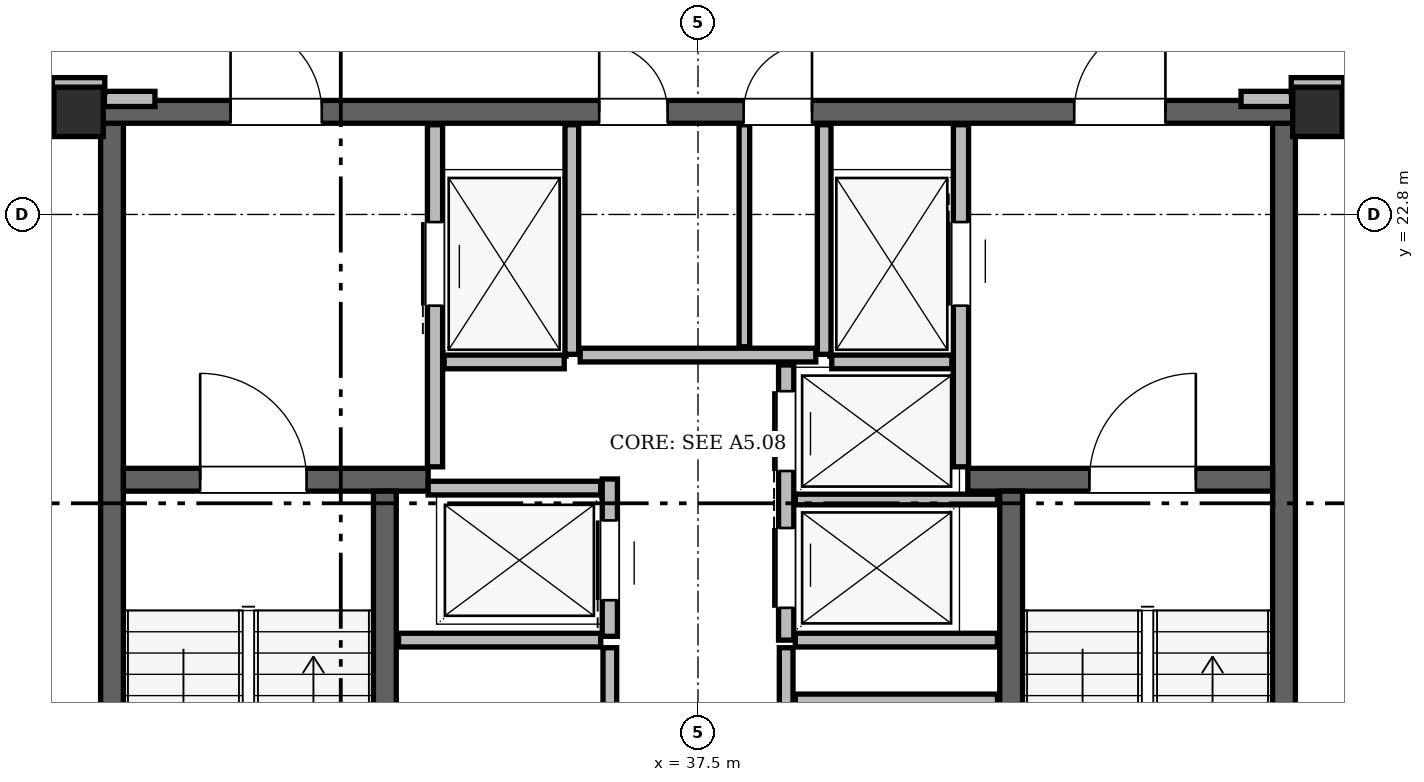
"""IFC4 building model, lengths in metres.
Left out: names, types, materials, properties, quantities, classifications, styles, units other than length and angle.
Written with IfcOpenShell. Run it as: python <this file> out.ifc"""

import sys

from ifc_helpers import new_model, si_unit, direction, frame, frame_2d, origin, origin_2d, place, context, subcontext, project, spatial, rectangle, hollow_rectangle, extrude, element, fill, save


model = new_model("IFC4")
c1 = context("Model", 3, precision=1e-05, world=origin(), true_north=direction((0.0, 1.0)))
c2 = subcontext(c1, "Body", "Model", "MODEL_VIEW")
j1 = project(units=[si_unit("LENGTHUNIT", "METRE"), si_unit("PLANEANGLEUNIT", "RADIAN")], contexts=[c1])
p1 = place(None, origin())
s1 = spatial("IfcSite", under=j1, at=p1, CompositionType="ELEMENT")
p2 = place(p1, origin())
s2 = spatial("IfcBuilding", under=s1, at=p2, CompositionType="ELEMENT")
p3 = place(p2, frame((0.0, 0.0, 305.1)))
s3 = spatial("IfcBuildingStorey", under=s2, at=p3, CompositionType="ELEMENT", Elevation=305.1)
for number, where, z_axis, x_axis in (
    (1, (45.65, 24.15, 0.0), (0.0, 0.0, 1.0), (1.0, 0.0, 0.0)),
    (2, (29.35, 24.15, 0.0), (0.0, 0.0, 1.0), (1.0, 0.0, 0.0)),
):
    element("IfcColumn", number, at=place(p3, frame(where, z_axis=z_axis, x_axis=x_axis)), inside=s3, PredefinedType="COLUMN", context=c2, shape_type="SweptSolid", body=[
        extrude(hollow_rectangle(XDim=0.65, YDim=0.65, WallThickness=0.05, at=origin_2d()), origin(), (0.0, 0.0, 1.0), 4.5),
    ])
for number, where, z_axis, x_axis in (
    (3, (29.79, 11.0, 0.0), (0.0, 0.0, 1.0), (0.0, 1.0, 0.0)),
    (4, (45.21, 11.0, 0.0), (0.0, 0.0, 1.0), (0.0, 1.0, 0.0)),
):
    element("IfcWall", number, at=place(p3, frame(where, z_axis=z_axis, x_axis=x_axis)), inside=s3, PredefinedType="SHEAR", context=c2, shape_type="SweptSolid", body=[
        extrude(rectangle(XDim=13.3, YDim=0.3, at=frame_2d((6.65, 0.0))), origin(), (0.0, 0.0, 1.0), 4.28),
    ])
p4 = place(p3, frame((29.65, 24.15, 0.0), z_axis=(0.0, 0.0, 1.0), x_axis=(1.0, 0.0, 0.0)))
e5 = element("IfcWall", 5, at=p4, inside=s3, PredefinedType="SHEAR", context=c2, shape_type="SweptSolid", body=[
    extrude(rectangle(XDim=15.7, YDim=0.3, at=frame_2d((7.85, 0.0))), origin(), (0.0, 0.0, 1.0), 4.28),
])
p5 = place(p4, frame((1.7, 0.0, 0.0)))
e6 = element("IfcOpeningElement", 6, at=p5, cuts=e5, PredefinedType="OPENING", context=c2, shape_type="SweptSolid", body=[
    extrude(rectangle(XDim=1.2, YDim=2.2, at=frame_2d((0.6, 1.1))), frame((0.0, 0.15, 0.0), z_axis=(0.0, -1.0, 0.0), x_axis=(1.0, 0.0, 0.0)), (0.0, 0.0, 1.0), 0.3),
])
p6 = place(p4, frame((12.8, 0.0, 0.0)))
e7 = element("IfcOpeningElement", 7, at=p6, cuts=e5, PredefinedType="OPENING", context=c2, shape_type="SweptSolid", body=[
    extrude(rectangle(XDim=1.2, YDim=2.2, at=frame_2d((0.6, 1.1))), frame((0.0, 0.15, 0.0), z_axis=(0.0, -1.0, 0.0), x_axis=(1.0, 0.0, 0.0)), (0.0, 0.0, 1.0), 0.3),
])
p7 = place(p4, frame((6.55, 0.0, 0.0)))
e8 = element("IfcOpeningElement", 8, at=p7, cuts=e5, PredefinedType="OPENING", context=c2, shape_type="SweptSolid", body=[
    extrude(rectangle(XDim=0.9, YDim=2.05, at=frame_2d((0.45, 1.025))), frame((0.0, 0.15, 0.0), z_axis=(0.0, -1.0, 0.0), x_axis=(1.0, 0.0, 0.0)), (0.0, 0.0, 1.0), 0.3),
])
p8 = place(p4, frame((8.45, 0.0, 0.0)))
e9 = element("IfcOpeningElement", 9, at=p8, cuts=e5, PredefinedType="OPENING", context=c2, shape_type="SweptSolid", body=[
    extrude(rectangle(XDim=0.9, YDim=2.05, at=frame_2d((0.45, 1.025))), frame((0.0, 0.15, 0.0), z_axis=(0.0, -1.0, 0.0), x_axis=(1.0, 0.0, 0.0)), (0.0, 0.0, 1.0), 0.3),
])
p9 = place(p3, frame((29.94, 19.31, 0.0), z_axis=(0.0, 0.0, 1.0), x_axis=(1.0, 0.0, 0.0)))
e10 = element("IfcWall", 10, at=p9, inside=s3, PredefinedType="SHEAR", context=c2, shape_type="SweptSolid", body=[
    extrude(rectangle(XDim=4.01, YDim=0.3, at=frame_2d((2.005, 0.0))), origin(), (0.0, 0.0, 1.0), 4.28),
])
p10 = place(p9, frame((1.01, 0.0, 0.0)))
e11 = element("IfcOpeningElement", 11, at=p10, cuts=e10, PredefinedType="OPENING", context=c2, shape_type="SweptSolid", body=[
    extrude(rectangle(XDim=1.4, YDim=2.2, at=frame_2d((0.7, 1.1))), frame((0.0, 0.15, 0.0), z_axis=(0.0, -1.0, 0.0), x_axis=(1.0, 0.0, 0.0)), (0.0, 0.0, 1.0), 0.3),
])
p11 = place(p3, frame((41.05, 19.31, 0.0), z_axis=(0.0, 0.0, 1.0), x_axis=(1.0, 0.0, 0.0)))
e12 = element("IfcWall", 12, at=p11, inside=s3, PredefinedType="SHEAR", context=c2, shape_type="SweptSolid", body=[
    extrude(rectangle(XDim=4.01, YDim=0.3, at=frame_2d((2.005, 0.0))), origin(), (0.0, 0.0, 1.0), 4.28),
])
p12 = place(p11, frame((1.6, 0.0, 0.0)))
e13 = element("IfcOpeningElement", 13, at=p12, cuts=e12, PredefinedType="OPENING", context=c2, shape_type="SweptSolid", body=[
    extrude(rectangle(XDim=1.4, YDim=2.2, at=frame_2d((0.7, 1.1))), frame((0.0, 0.15, 0.0), z_axis=(0.0, -1.0, 0.0), x_axis=(1.0, 0.0, 0.0)), (0.0, 0.0, 1.0), 0.3),
])
for number, where, z_axis, x_axis in (
    (14, (33.38, 11.54, 0.0), (0.0, 0.0, 1.0), (0.0, 1.0, 0.0)),
    (15, (41.62, 11.54, 0.0), (0.0, 0.0, 1.0), (0.0, 1.0, 0.0)),
):
    element("IfcWall", number, at=place(p3, frame(where, z_axis=z_axis, x_axis=x_axis)), inside=s3, PredefinedType="SHEAR", context=c2, shape_type="SweptSolid", body=[
        extrude(rectangle(XDim=7.62, YDim=0.3, at=frame_2d((3.81, 0.0))), origin(), (0.0, 0.0, 1.0), 4.28),
    ])
p13 = place(p3, frame((34.04, 19.48, 0.0), z_axis=(0.0, 0.0, 1.0), x_axis=(0.0, 1.0, 0.0)))
e16 = element("IfcWall", 16, at=p13, inside=s3, PredefinedType="PARTITIONING", context=c2, shape_type="SweptSolid", body=[
    extrude(rectangle(XDim=4.5, YDim=0.2, at=frame_2d((2.25, 0.0))), origin(), (0.0, 0.0, 1.0), 4.28),
])
p14 = place(p13, frame((2.12, 0.0, 0.0)))
e17 = element("IfcOpeningElement", 17, at=p14, cuts=e16, PredefinedType="OPENING", context=c2, shape_type="SweptSolid", body=[
    extrude(rectangle(XDim=1.1, YDim=2.2, at=frame_2d((0.55, 1.1))), frame((0.0, 0.1, 0.0), z_axis=(0.0, -1.0, 0.0), x_axis=(1.0, 0.0, 0.0)), (0.0, 0.0, 1.0), 0.2),
])
p15 = place(p3, frame((35.84, 20.96, 0.0), z_axis=(0.0, 0.0, 1.0), x_axis=(0.0, 1.0, 0.0)))
e18 = element("IfcWall", 18, at=p15, inside=s3, PredefinedType="PARTITIONING", context=c2, shape_type="SweptSolid", body=[
    extrude(rectangle(XDim=3.02, YDim=0.18, at=frame_2d((1.51, 0.0))), origin(), (0.0, 0.0, 1.0), 4.28),
])
p16 = place(p3, frame((34.16, 20.86, 0.0), z_axis=(0.0, 0.0, 1.0), x_axis=(1.0, 0.0, 0.0)))
e19 = element("IfcWall", 19, at=p16, inside=s3, PredefinedType="PARTITIONING", context=c2, shape_type="SweptSolid", body=[
    extrude(rectangle(XDim=1.58, YDim=0.18, at=frame_2d((0.79, 0.0))), origin(), (0.0, 0.0, 1.0), 4.28),
])
p17 = place(p3, frame((40.96, 19.48, 0.0), z_axis=(0.0, 0.0, 1.0), x_axis=(0.0, 1.0, 0.0)))
e20 = element("IfcWall", 20, at=p17, inside=s3, PredefinedType="PARTITIONING", context=c2, shape_type="SweptSolid", body=[
    extrude(rectangle(XDim=4.5, YDim=0.2, at=frame_2d((2.25, 0.0))), origin(), (0.0, 0.0, 1.0), 4.28),
])
p18 = place(p17, frame((2.12, 0.0, 0.0)))
e21 = element("IfcOpeningElement", 21, at=p18, cuts=e20, PredefinedType="OPENING", context=c2, shape_type="SweptSolid", body=[
    extrude(rectangle(XDim=1.1, YDim=2.2, at=frame_2d((0.55, 1.1))), frame((0.0, 0.1, 0.0), z_axis=(0.0, -1.0, 0.0), x_axis=(1.0, 0.0, 0.0)), (0.0, 0.0, 1.0), 0.2),
])
p19 = place(p3, frame((39.16, 20.96, 0.0), z_axis=(0.0, 0.0, 1.0), x_axis=(0.0, 1.0, 0.0)))
e22 = element("IfcWall", 22, at=p19, inside=s3, PredefinedType="PARTITIONING", context=c2, shape_type="SweptSolid", body=[
    extrude(rectangle(XDim=3.02, YDim=0.18, at=frame_2d((1.51, 0.0))), origin(), (0.0, 0.0, 1.0), 4.28),
])
p20 = place(p3, frame((39.26, 20.86, 0.0), z_axis=(0.0, 0.0, 1.0), x_axis=(1.0, 0.0, 0.0)))
e23 = element("IfcWall", 23, at=p20, inside=s3, PredefinedType="PARTITIONING", context=c2, shape_type="SweptSolid", body=[
    extrude(rectangle(XDim=1.58, YDim=0.18, at=frame_2d((0.79, 0.0))), origin(), (0.0, 0.0, 1.0), 4.28),
])
p21 = place(p3, frame((36.34, 17.25, 0.0), z_axis=(0.0, 0.0, 1.0), x_axis=(0.0, 1.0, 0.0)))
e24 = element("IfcWall", 24, at=p21, inside=s3, PredefinedType="PARTITIONING", context=c2, shape_type="SweptSolid", body=[
    extrude(rectangle(XDim=2.07, YDim=0.2, at=frame_2d((1.035, 0.0))), origin(), (0.0, 0.0, 1.0), 4.28),
])
p22 = place(p21, frame((0.475, 0.0, 0.0)))
e25 = element("IfcOpeningElement", 25, at=p22, cuts=e24, PredefinedType="OPENING", context=c2, shape_type="SweptSolid", body=[
    extrude(rectangle(XDim=1.05, YDim=2.15, at=frame_2d((0.525, 1.075))), frame((0.0, 0.1, 0.0), z_axis=(0.0, -1.0, 0.0), x_axis=(1.0, 0.0, 0.0)), (0.0, 0.0, 1.0), 0.2),
])
p23 = place(p3, frame((33.95, 19.2, 0.0), z_axis=(0.0, 0.0, 1.0), x_axis=(1.0, 0.0, 0.0)))
e26 = element("IfcWall", 26, at=p23, inside=s3, PredefinedType="PARTITIONING", context=c2, shape_type="SweptSolid", body=[
    extrude(rectangle(XDim=2.27, YDim=0.18, at=frame_2d((1.135, 0.0))), origin(), (0.0, 0.0, 1.0), 4.28),
])
p24 = place(p3, frame((33.56, 17.2, 0.0), z_axis=(0.0, 0.0, 1.0), x_axis=(1.0, 0.0, 0.0)))
e27 = element("IfcWall", 27, at=p24, inside=s3, PredefinedType="PARTITIONING", context=c2, shape_type="SweptSolid", body=[
    extrude(rectangle(XDim=2.66, YDim=0.18, at=frame_2d((1.33, 0.0))), origin(), (0.0, 0.0, 1.0), 4.28),
])
p25 = place(p3, frame((36.34, 11.55, 0.0), z_axis=(0.0, 0.0, 1.0), x_axis=(0.0, 1.0, 0.0)))
e28 = element("IfcWall", 28, at=p25, inside=s3, PredefinedType="PARTITIONING", context=c2, shape_type="SweptSolid", body=[
    extrude(rectangle(XDim=5.55, YDim=0.18, at=frame_2d((2.775, 0.0))), origin(), (0.0, 0.0, 1.0), 4.28),
])
p26 = place(p25, frame((2.85, 0.0, 0.0)))
e29 = element("IfcOpeningElement", 29, at=p26, cuts=e28, PredefinedType="OPENING", context=c2, shape_type="SweptSolid", body=[
    extrude(rectangle(XDim=0.95, YDim=2.1, at=frame_2d((0.475, 1.05))), frame((0.0, 0.09, 0.0), z_axis=(0.0, -1.0, 0.0), x_axis=(1.0, 0.0, 0.0)), (0.0, 0.0, 1.0), 0.18),
])
p27 = place(p3, frame((38.66, 17.2, 0.0), z_axis=(0.0, 0.0, 1.0), x_axis=(0.0, 1.0, 0.0)))
e30 = element("IfcWall", 30, at=p27, inside=s3, PredefinedType="PARTITIONING", context=c2, shape_type="SweptSolid", body=[
    extrude(rectangle(XDim=3.62, YDim=0.2, at=frame_2d((1.81, 0.0))), origin(), (0.0, 0.0, 1.0), 4.28),
])
p28 = place(p27, frame((0.425, 0.0, 0.0)))
e31 = element("IfcOpeningElement", 31, at=p28, cuts=e30, PredefinedType="OPENING", context=c2, shape_type="SweptSolid", body=[
    extrude(rectangle(XDim=1.05, YDim=2.15, at=frame_2d((0.525, 1.075))), frame((0.0, 0.1, 0.0), z_axis=(0.0, -1.0, 0.0), x_axis=(1.0, 0.0, 0.0)), (0.0, 0.0, 1.0), 0.2),
])
p29 = place(p27, frame((2.225, 0.0, 0.0)))
e32 = element("IfcOpeningElement", 32, at=p29, cuts=e30, PredefinedType="OPENING", context=c2, shape_type="SweptSolid", body=[
    extrude(rectangle(XDim=1.05, YDim=2.15, at=frame_2d((0.525, 1.075))), frame((0.0, 0.1, 0.0), z_axis=(0.0, -1.0, 0.0), x_axis=(1.0, 0.0, 0.0)), (0.0, 0.0, 1.0), 0.2),
])
p30 = place(p3, frame((38.78, 17.2, 0.0), z_axis=(0.0, 0.0, 1.0), x_axis=(1.0, 0.0, 0.0)))
e33 = element("IfcWall", 33, at=p30, inside=s3, PredefinedType="PARTITIONING", context=c2, shape_type="SweptSolid", body=[
    extrude(rectangle(XDim=2.66, YDim=0.18, at=frame_2d((1.33, 0.0))), origin(), (0.0, 0.0, 1.0), 4.28),
])
p31 = place(p3, frame((38.78, 19.05, 0.0), z_axis=(0.0, 0.0, 1.0), x_axis=(1.0, 0.0, 0.0)))
e34 = element("IfcWall", 34, at=p31, inside=s3, PredefinedType="PARTITIONING", context=c2, shape_type="SweptSolid", body=[
    extrude(rectangle(XDim=2.66, YDim=0.14, at=frame_2d((1.33, 0.0))), origin(), (0.0, 0.0, 1.0), 4.28),
])
p32 = place(p3, frame((38.66, 11.55, 0.0), z_axis=(0.0, 0.0, 1.0), x_axis=(0.0, 1.0, 0.0)))
e35 = element("IfcWall", 35, at=p32, inside=s3, PredefinedType="PARTITIONING", context=c2, shape_type="SweptSolid", body=[
    extrude(rectangle(XDim=5.55, YDim=0.18, at=frame_2d((2.775, 0.0))), origin(), (0.0, 0.0, 1.0), 4.28),
])
p33 = place(p32, frame((2.0, 0.0, 0.0)))
e36 = element("IfcOpeningElement", 36, at=p33, cuts=e35, PredefinedType="OPENING", context=c2, shape_type="SweptSolid", body=[
    extrude(rectangle(XDim=0.95, YDim=2.1, at=frame_2d((0.475, 1.05))), frame((0.0, 0.09, 0.0), z_axis=(0.0, -1.0, 0.0), x_axis=(1.0, 0.0, 0.0)), (0.0, 0.0, 1.0), 0.18),
])
p34 = place(p3, frame((38.78, 16.42, 0.0), z_axis=(0.0, 0.0, 1.0), x_axis=(1.0, 0.0, 0.0)))
e37 = element("IfcWall", 37, at=p34, inside=s3, PredefinedType="PARTITIONING", context=c2, shape_type="SweptSolid", body=[
    extrude(rectangle(XDim=2.66, YDim=0.14, at=frame_2d((1.33, 0.0))), origin(), (0.0, 0.0, 1.0), 4.28),
])
p35 = place(p3, frame((35.95, 20.95, 0.0), z_axis=(0.0, 0.0, 1.0), x_axis=(1.0, 0.0, 0.0)))
e38 = element("IfcWall", 38, at=p35, inside=s3, PredefinedType="PARTITIONING", context=c2, shape_type="SweptSolid", body=[
    extrude(rectangle(XDim=3.1, YDim=0.18, at=frame_2d((1.55, 0.0))), origin(), (0.0, 0.0, 1.0), 4.28),
])
p36 = place(p3, frame((38.11, 21.06, 0.0), z_axis=(0.0, 0.0, 1.0), x_axis=(0.0, 1.0, 0.0)))
e39 = element("IfcWall", 39, at=p36, inside=s3, PredefinedType="PARTITIONING", context=c2, shape_type="SweptSolid", body=[
    extrude(rectangle(XDim=2.92, YDim=0.14, at=frame_2d((1.46, 0.0))), origin(), (0.0, 0.0, 1.0), 4.28),
])
p37 = place(p3, frame((28.62, 24.32, 0.0), z_axis=(0.0, 0.0, 1.0), x_axis=(1.0, 0.0, 0.0)))
e40 = element("IfcWall", 40, at=p37, inside=s3, PredefinedType="PARTITIONING", context=c2, shape_type="SweptSolid", body=[
    extrude(rectangle(XDim=0.39, YDim=0.2, at=frame_2d((0.195, 0.0))), origin(), (0.0, 0.0, 1.0), 4.28),
])
for number, where, z_axis, x_axis in (
    (41, (29.69, 24.32, 0.0), (0.0, 0.0, 1.0), (1.0, 0.0, 0.0)),
    (42, (44.645, 24.32, 0.0), (0.0, 0.0, 1.0), (1.0, 0.0, 0.0)),
):
    element("IfcWall", number, at=place(p3, frame(where, z_axis=z_axis, x_axis=x_axis)), inside=s3, PredefinedType="PARTITIONING", context=c2, shape_type="SweptSolid", body=[
        extrude(rectangle(XDim=0.665, YDim=0.2, at=frame_2d((0.333, 0.0))), origin(), (0.0, 0.0, 1.0), 3.42),
    ])
p38 = place(p3, frame((45.99, 24.32, 0.0), z_axis=(0.0, 0.0, 1.0), x_axis=(1.0, 0.0, 0.0)))
e43 = element("IfcWall", 43, at=p38, inside=s3, PredefinedType="PARTITIONING", context=c2, shape_type="SweptSolid", body=[
    extrude(rectangle(XDim=0.39, YDim=0.2, at=frame_2d((0.195, 0.0))), origin(), (0.0, 0.0, 1.0), 4.28),
])
for number, where, z_axis, x_axis in (
    (44, (29.005, 24.5, 0.0), (0.0, 0.0, 1.0), (1.0, 0.0, 0.0)),
    (45, (45.305, 24.5, 0.0), (0.0, 0.0, 1.0), (1.0, 0.0, 0.0)),
):
    element("IfcWall", number, at=place(p3, frame(where, z_axis=z_axis, x_axis=x_axis)), inside=s3, PredefinedType="PARTITIONING", context=c2, shape_type="SweptSolid", body=[
        extrude(rectangle(XDim=0.69, YDim=0.2, at=frame_2d((0.345, 0.0))), origin(), (0.0, 0.0, 1.0), 4.28),
    ])
p39 = place(p14, origin())
e46 = element("IfcDoor", 46, at=p39, inside=s3, OperationType="SLIDING_TO_LEFT", PredefinedType="DOOR", context=c2, shape_type="SweptSolid", body=[
    extrude(rectangle(XDim=1.1, YDim=2.2, at=frame_2d((0.55, 1.1))), frame((0.0, 0.025, 0.0), z_axis=(0.0, -1.0, 0.0), x_axis=(1.0, 0.0, 0.0)), (0.0, 0.0, 1.0), 0.05),
])
fill(e17, e46)
p40 = place(p18, origin())
e47 = element("IfcDoor", 47, at=p40, inside=s3, OperationType="SLIDING_TO_RIGHT", PredefinedType="DOOR", context=c2, shape_type="SweptSolid", body=[
    extrude(rectangle(XDim=1.1, YDim=2.2, at=frame_2d((0.55, 1.1))), frame((0.0, 0.025, 0.0), z_axis=(0.0, -1.0, 0.0), x_axis=(1.0, 0.0, 0.0)), (0.0, 0.0, 1.0), 0.05),
])
fill(e21, e47)
p41 = place(p22, origin())
e48 = element("IfcDoor", 48, at=p41, inside=s3, OperationType="SLIDING_TO_LEFT", PredefinedType="DOOR", context=c2, shape_type="SweptSolid", body=[
    extrude(rectangle(XDim=1.05, YDim=2.15, at=frame_2d((0.525, 1.075))), frame((0.0, 0.025, 0.0), z_axis=(0.0, -1.0, 0.0), x_axis=(1.0, 0.0, 0.0)), (0.0, 0.0, 1.0), 0.05),
])
fill(e25, e48)
p42 = place(p28, origin())
e49 = element("IfcDoor", 49, at=p42, inside=s3, OperationType="SLIDING_TO_RIGHT", PredefinedType="DOOR", context=c2, shape_type="SweptSolid", body=[
    extrude(rectangle(XDim=1.05, YDim=2.15, at=frame_2d((0.525, 1.075))), frame((0.0, 0.025, 0.0), z_axis=(0.0, -1.0, 0.0), x_axis=(1.0, 0.0, 0.0)), (0.0, 0.0, 1.0), 0.05),
])
fill(e31, e49)
p43 = place(p29, origin())
e50 = element("IfcDoor", 50, at=p43, inside=s3, OperationType="SLIDING_TO_LEFT", PredefinedType="DOOR", context=c2, shape_type="SweptSolid", body=[
    extrude(rectangle(XDim=1.05, YDim=2.15, at=frame_2d((0.525, 1.075))), frame((0.0, 0.025, 0.0), z_axis=(0.0, -1.0, 0.0), x_axis=(1.0, 0.0, 0.0)), (0.0, 0.0, 1.0), 0.05),
])
fill(e32, e50)
p44 = place(p10, origin())
e51 = element("IfcDoor", 51, at=p44, inside=s3, OperationType="SINGLE_SWING_LEFT", PredefinedType="DOOR", context=c2, shape_type="SweptSolid", body=[
    extrude(rectangle(XDim=1.4, YDim=2.2, at=frame_2d((0.7, 1.1))), frame((0.0, 0.025, 0.0), z_axis=(0.0, -1.0, 0.0), x_axis=(1.0, 0.0, 0.0)), (0.0, 0.0, 1.0), 0.05),
])
fill(e11, e51)
p45 = place(p12, origin())
e52 = element("IfcDoor", 52, at=p45, inside=s3, OperationType="SINGLE_SWING_RIGHT", PredefinedType="DOOR", context=c2, shape_type="SweptSolid", body=[
    extrude(rectangle(XDim=1.4, YDim=2.2, at=frame_2d((0.7, 1.1))), frame((0.0, 0.025, 0.0), z_axis=(0.0, -1.0, 0.0), x_axis=(1.0, 0.0, 0.0)), (0.0, 0.0, 1.0), 0.05),
])
fill(e13, e52)
p46 = place(p5, origin())
e53 = element("IfcDoor", 53, at=p46, inside=s3, OperationType="SINGLE_SWING_LEFT", PredefinedType="DOOR", context=c2, shape_type="SweptSolid", body=[
    extrude(rectangle(XDim=1.2, YDim=2.2, at=frame_2d((0.6, 1.1))), frame((0.0, 0.025, 0.0), z_axis=(0.0, -1.0, 0.0), x_axis=(1.0, 0.0, 0.0)), (0.0, 0.0, 1.0), 0.05),
])
fill(e6, e53)
p47 = place(p6, origin())
e54 = element("IfcDoor", 54, at=p47, inside=s3, OperationType="SINGLE_SWING_RIGHT", PredefinedType="DOOR", context=c2, shape_type="SweptSolid", body=[
    extrude(rectangle(XDim=1.2, YDim=2.2, at=frame_2d((0.6, 1.1))), frame((0.0, 0.025, 0.0), z_axis=(0.0, -1.0, 0.0), x_axis=(1.0, 0.0, 0.0)), (0.0, 0.0, 1.0), 0.05),
])
fill(e7, e54)
p48 = place(p7, origin())
e55 = element("IfcDoor", 55, at=p48, inside=s3, OperationType="SINGLE_SWING_LEFT", PredefinedType="DOOR", context=c2, shape_type="SweptSolid", body=[
    extrude(rectangle(XDim=0.9, YDim=2.05, at=frame_2d((0.45, 1.025))), frame((0.0, 0.025, 0.0), z_axis=(0.0, -1.0, 0.0), x_axis=(1.0, 0.0, 0.0)), (0.0, 0.0, 1.0), 0.05),
])
fill(e8, e55)
p49 = place(p8, origin())
e56 = element("IfcDoor", 56, at=p49, inside=s3, OperationType="SINGLE_SWING_RIGHT", PredefinedType="DOOR", context=c2, shape_type="SweptSolid", body=[
    extrude(rectangle(XDim=0.9, YDim=2.05, at=frame_2d((0.45, 1.025))), frame((0.0, 0.025, 0.0), z_axis=(0.0, -1.0, 0.0), x_axis=(1.0, 0.0, 0.0)), (0.0, 0.0, 1.0), 0.05),
])
fill(e9, e56)
save(model, sys.argv[1])
